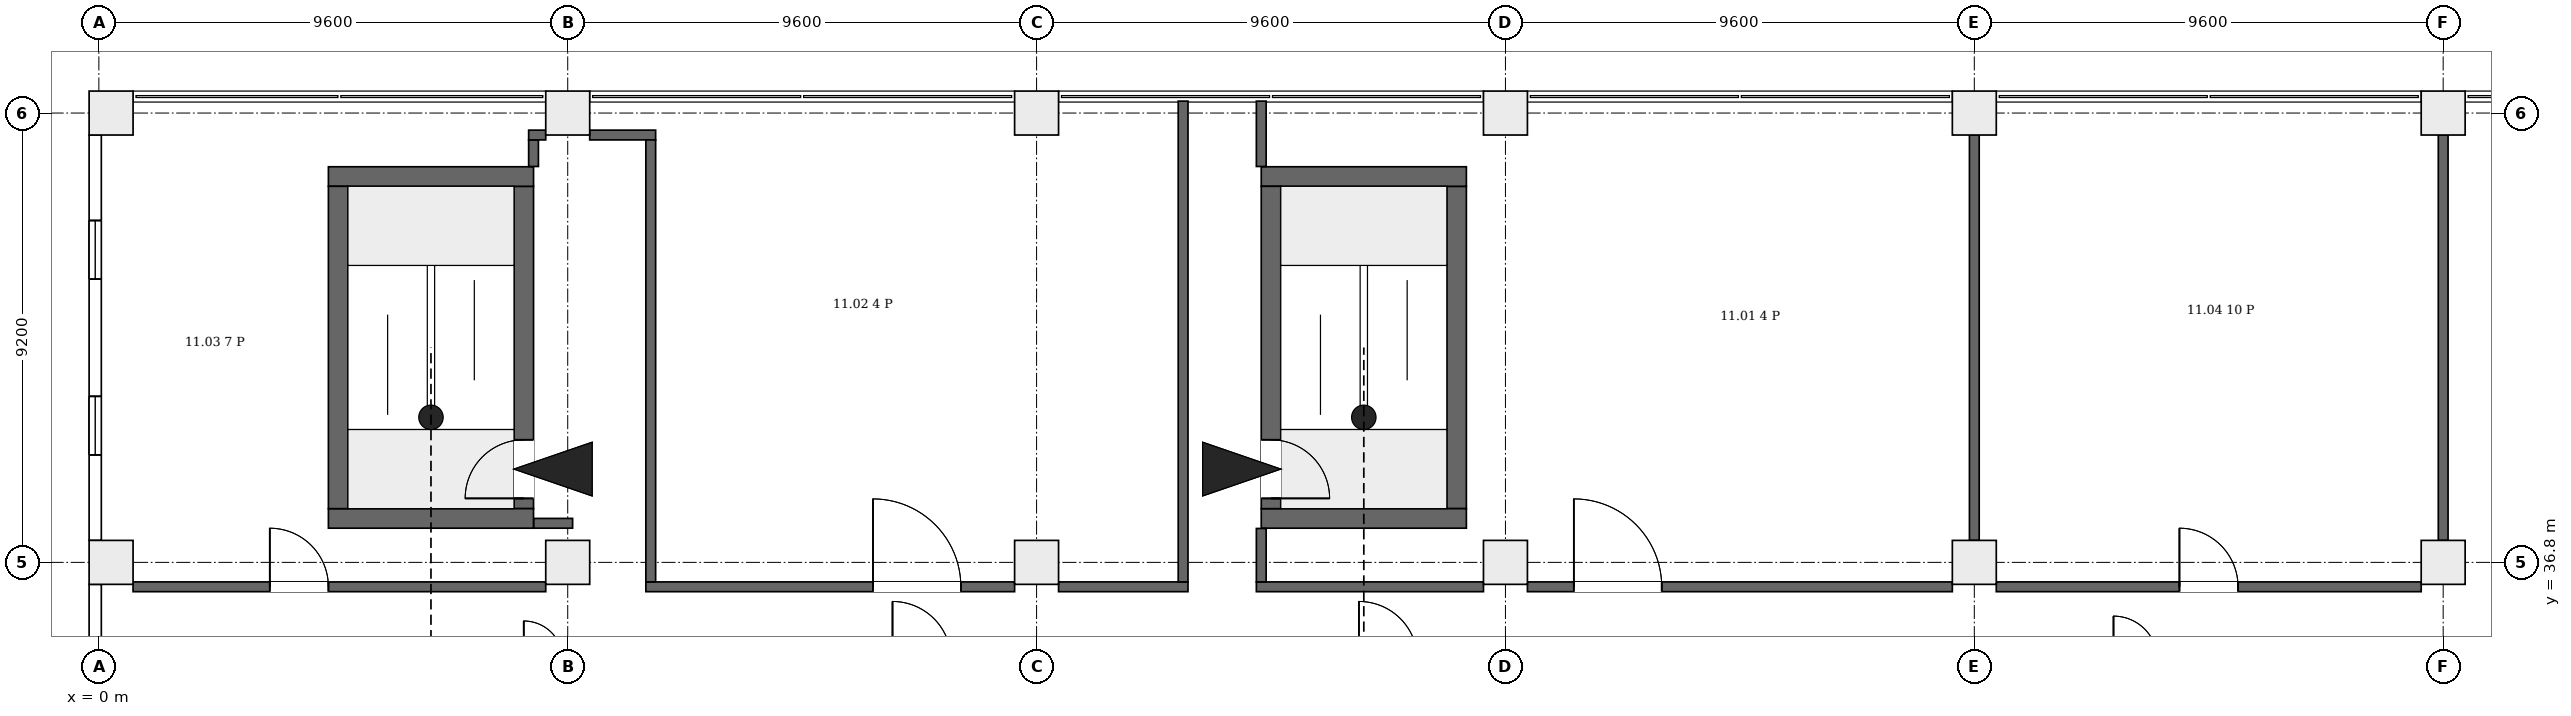
"""IFC4 building model, lengths in metres.
Left out: names, types, materials, properties, quantities, classifications, styles, units other than length and angle.
Written with IfcOpenShell. Run it as: python <this file> out.ifc"""

import sys

from ifc_helpers import new_model, si_unit, direction, frame, frame_2d, origin, origin_2d, place, context, subcontext, project, spatial, rectangle, extrude, element, fill, save


model = new_model("IFC4")
c1 = context("Model", 3, precision=1e-05, world=origin(), true_north=direction((0.0, 1.0)))
c2 = subcontext(c1, "Body", "Model", "MODEL_VIEW")
j1 = project(units=[si_unit("LENGTHUNIT", "METRE"), si_unit("PLANEANGLEUNIT", "RADIAN")], contexts=[c1])
p1 = place(None, origin())
s1 = spatial("IfcSite", under=j1, at=p1, CompositionType="ELEMENT")
p2 = place(p1, origin())
s2 = spatial("IfcBuilding", under=s1, at=p2, CompositionType="ELEMENT")
p3 = place(p2, frame((0.0, 0.0, 57.1)))
s3 = spatial("IfcBuildingStorey", under=s2, at=p3, CompositionType="ELEMENT", Elevation=57.1)
for number, where, z_axis, x_axis in (
    (1, (4.7, 37.7, 0.0), (0.0, 0.0, 1.0), (1.0, 0.0, 0.0)),
    (2, (4.7, 44.7, 0.0), (0.0, 0.0, 1.0), (1.0, 0.0, 0.0)),
):
    element("IfcWall", number, at=place(p3, frame(where, z_axis=z_axis, x_axis=x_axis)), inside=s3, PredefinedType="SHEAR", context=c2, shape_type="SweptSolid", body=[
        extrude(rectangle(XDim=4.2, YDim=0.4, at=frame_2d((2.1, 0.0))), origin(), (0.0, 0.0, 1.0), 4.2),
    ])
p4 = place(p3, frame((4.9, 37.9, 0.0), z_axis=(0.0, 0.0, 1.0), x_axis=(0.0, 1.0, 0.0)))
e3 = element("IfcWall", 3, at=p4, inside=s3, PredefinedType="SHEAR", context=c2, shape_type="SweptSolid", body=[
    extrude(rectangle(XDim=6.6, YDim=0.4, at=frame_2d((3.3, 0.0))), origin(), (0.0, 0.0, 1.0), 4.2),
])
p5 = place(p3, frame((8.7, 37.9, 0.0), z_axis=(0.0, 0.0, 1.0), x_axis=(0.0, 1.0, 0.0)))
e4 = element("IfcWall", 4, at=p5, inside=s3, PredefinedType="SHEAR", context=c2, shape_type="SweptSolid", body=[
    extrude(rectangle(XDim=6.6, YDim=0.4, at=frame_2d((3.3, 0.0))), origin(), (0.0, 0.0, 1.0), 4.2),
])
p6 = place(p5, frame((0.21, 0.0, 0.0)))
e5 = element("IfcOpeningElement", 5, at=p6, cuts=e4, PredefinedType="OPENING", context=c2, shape_type="SweptSolid", body=[
    extrude(rectangle(XDim=1.2, YDim=2.1, at=frame_2d((0.6, 1.05))), frame((0.0, 0.21, 0.0), z_axis=(0.0, -1.0, 0.0), x_axis=(1.0, 0.0, 0.0)), (0.0, 0.0, 1.0), 0.42),
])
for number, where, z_axis, x_axis in (
    (6, (23.8, 37.7, 0.0), (0.0, 0.0, 1.0), (1.0, 0.0, 0.0)),
    (7, (23.8, 44.7, 0.0), (0.0, 0.0, 1.0), (1.0, 0.0, 0.0)),
):
    element("IfcWall", number, at=place(p3, frame(where, z_axis=z_axis, x_axis=x_axis)), inside=s3, PredefinedType="SHEAR", context=c2, shape_type="SweptSolid", body=[
        extrude(rectangle(XDim=4.2, YDim=0.4, at=frame_2d((2.1, 0.0))), origin(), (0.0, 0.0, 1.0), 4.2),
    ])
p7 = place(p3, frame((24.0, 37.9, 0.0), z_axis=(0.0, 0.0, 1.0), x_axis=(0.0, 1.0, 0.0)))
e8 = element("IfcWall", 8, at=p7, inside=s3, PredefinedType="SHEAR", context=c2, shape_type="SweptSolid", body=[
    extrude(rectangle(XDim=6.6, YDim=0.4, at=frame_2d((3.3, 0.0))), origin(), (0.0, 0.0, 1.0), 4.2),
])
p8 = place(p7, frame((0.21, 0.0, 0.0)))
e9 = element("IfcOpeningElement", 9, at=p8, cuts=e8, PredefinedType="OPENING", context=c2, shape_type="SweptSolid", body=[
    extrude(rectangle(XDim=1.2, YDim=2.1, at=frame_2d((0.6, 1.05))), frame((0.0, 0.21, 0.0), z_axis=(0.0, -1.0, 0.0), x_axis=(1.0, 0.0, 0.0)), (0.0, 0.0, 1.0), 0.42),
])
p9 = place(p3, frame((27.8, 37.9, 0.0), z_axis=(0.0, 0.0, 1.0), x_axis=(0.0, 1.0, 0.0)))
e10 = element("IfcWall", 10, at=p9, inside=s3, PredefinedType="SHEAR", context=c2, shape_type="SweptSolid", body=[
    extrude(rectangle(XDim=6.6, YDim=0.4, at=frame_2d((3.3, 0.0))), origin(), (0.0, 0.0, 1.0), 4.2),
])
for number, where, z_axis, x_axis in (
    (11, (0.25, 36.8, 0.0), (0.0, 0.0, 1.0), (1.0, 0.0, 0.0)),
    (12, (9.6, 36.8, 0.0), (0.0, 0.0, 1.0), (1.0, 0.0, 0.0)),
    (13, (19.2, 36.8, 0.0), (0.0, 0.0, 1.0), (1.0, 0.0, 0.0)),
    (14, (28.8, 36.8, 0.0), (0.0, 0.0, 1.0), (1.0, 0.0, 0.0)),
    (15, (38.4, 36.8, 0.0), (0.0, 0.0, 1.0), (1.0, 0.0, 0.0)),
    (16, (48.0, 36.8, 0.0), (0.0, 0.0, 1.0), (1.0, 0.0, 0.0)),
    (17, (0.25, 46.0, 0.0), (0.0, 0.0, 1.0), (1.0, 0.0, 0.0)),
    (18, (9.6, 46.0, 0.0), (0.0, 0.0, 1.0), (1.0, 0.0, 0.0)),
    (19, (19.2, 46.0, 0.0), (0.0, 0.0, 1.0), (1.0, 0.0, 0.0)),
    (20, (28.8, 46.0, 0.0), (0.0, 0.0, 1.0), (1.0, 0.0, 0.0)),
    (21, (38.4, 46.0, 0.0), (0.0, 0.0, 1.0), (1.0, 0.0, 0.0)),
    (22, (48.0, 46.0, 0.0), (0.0, 0.0, 1.0), (1.0, 0.0, 0.0)),
):
    element("IfcColumn", number, at=place(p3, frame(where, z_axis=z_axis, x_axis=x_axis)), inside=s3, PredefinedType="COLUMN", context=c2, shape_type="SweptSolid", body=[
        extrude(rectangle(XDim=0.9, YDim=0.9, at=origin_2d()), origin(), (0.0, 0.0, 1.0), 4.2),
    ])
p10 = place(p3, frame((-0.074, 36.35, 0.0), z_axis=(0.0, 0.0, 1.0), x_axis=(0.0, -1.0, 0.0)))
e23 = element("IfcWall", 23, at=p10, inside=s3, PredefinedType="ELEMENTEDWALL", context=c2, shape_type="SweptSolid", body=[
    extrude(rectangle(XDim=8.3, YDim=0.25, at=frame_2d((4.15, 0.0))), origin(), (0.0, 0.0, 1.0), 3.9),
])
p11 = place(p10, frame((5.35, 0.0, 0.9)))
e24 = element("IfcOpeningElement", 24, at=p11, cuts=e23, PredefinedType="OPENING", context=c2, shape_type="SweptSolid", body=[
    extrude(rectangle(XDim=1.2, YDim=2.6, at=frame_2d((0.6, 1.3))), frame((0.0, 0.135, 0.0), z_axis=(0.0, -1.0, 0.0), x_axis=(1.0, 0.0, 0.0)), (0.0, 0.0, 1.0), 0.27),
])
p12 = place(p10, frame((1.75, 0.0, 0.9)))
e25 = element("IfcOpeningElement", 25, at=p12, cuts=e23, PredefinedType="OPENING", context=c2, shape_type="SweptSolid", body=[
    extrude(rectangle(XDim=1.2, YDim=2.6, at=frame_2d((0.6, 1.3))), frame((0.0, 0.135, 0.0), z_axis=(0.0, -1.0, 0.0), x_axis=(1.0, 0.0, 0.0)), (0.0, 0.0, 1.0), 0.27),
])
p13 = place(p3, frame((-0.074, 45.55, 0.0), z_axis=(0.0, 0.0, 1.0), x_axis=(0.0, -1.0, 0.0)))
e26 = element("IfcWall", 26, at=p13, inside=s3, PredefinedType="ELEMENTEDWALL", context=c2, shape_type="SweptSolid", body=[
    extrude(rectangle(XDim=8.3, YDim=0.25, at=frame_2d((4.15, 0.0))), origin(), (0.0, 0.0, 1.0), 3.9),
])
p14 = place(p13, frame((5.35, 0.0, 0.9)))
e27 = element("IfcOpeningElement", 27, at=p14, cuts=e26, PredefinedType="OPENING", context=c2, shape_type="SweptSolid", body=[
    extrude(rectangle(XDim=1.2, YDim=2.6, at=frame_2d((0.6, 1.3))), frame((0.0, 0.135, 0.0), z_axis=(0.0, -1.0, 0.0), x_axis=(1.0, 0.0, 0.0)), (0.0, 0.0, 1.0), 0.27),
])
p15 = place(p13, frame((1.75, 0.0, 0.9)))
e28 = element("IfcOpeningElement", 28, at=p15, cuts=e26, PredefinedType="OPENING", context=c2, shape_type="SweptSolid", body=[
    extrude(rectangle(XDim=1.2, YDim=2.6, at=frame_2d((0.6, 1.3))), frame((0.0, 0.135, 0.0), z_axis=(0.0, -1.0, 0.0), x_axis=(1.0, 0.0, 0.0)), (0.0, 0.0, 1.0), 0.27),
])
p16 = place(p3, frame((0.7, 36.3, 0.0), z_axis=(0.0, 0.0, 1.0), x_axis=(1.0, 0.0, 0.0)))
e29 = element("IfcWall", 29, at=p16, inside=s3, PredefinedType="PARTITIONING", context=c2, shape_type="SweptSolid", body=[
    extrude(rectangle(XDim=8.45, YDim=0.2, at=frame_2d((4.225, 0.0))), origin(), (0.0, 0.0, 1.0), 3.9),
])
p17 = place(p16, frame((2.8, 0.0, 0.0)))
e30 = element("IfcOpeningElement", 30, at=p17, cuts=e29, PredefinedType="OPENING", context=c2, shape_type="SweptSolid", body=[
    extrude(rectangle(XDim=1.2, YDim=2.1, at=frame_2d((0.6, 1.05))), frame((0.0, 0.11, 0.0), z_axis=(0.0, -1.0, 0.0), x_axis=(1.0, 0.0, 0.0)), (0.0, 0.0, 1.0), 0.22),
])
p18 = place(p3, frame((8.9, 44.906, 0.0), z_axis=(0.0, 0.0, 1.0), x_axis=(0.0, 1.0, 0.0)))
e31 = element("IfcWall", 31, at=p18, inside=s3, PredefinedType="PARTITIONING", context=c2, shape_type="SweptSolid", body=[
    extrude(rectangle(XDim=0.544, YDim=0.2, at=frame_2d((0.272, 0.0))), origin(), (0.0, 0.0, 1.0), 3.9),
])
p19 = place(p3, frame((8.8, 45.55, 0.0), z_axis=(0.0, 0.0, 1.0), x_axis=(1.0, 0.0, 0.0)))
e32 = element("IfcWall", 32, at=p19, inside=s3, PredefinedType="PARTITIONING", context=c2, shape_type="SweptSolid", body=[
    extrude(rectangle(XDim=0.35, YDim=0.2, at=frame_2d((0.175, 0.0))), origin(), (0.0, 0.0, 1.0), 3.9),
])
p20 = place(p3, frame((8.906, 37.6, 0.0), z_axis=(0.0, 0.0, 1.0), x_axis=(1.0, 0.0, 0.0)))
e33 = element("IfcWall", 33, at=p20, inside=s3, PredefinedType="PARTITIONING", context=c2, shape_type="SweptSolid", body=[
    extrude(rectangle(XDim=0.794, YDim=0.2, at=frame_2d((0.397, 0.0))), origin(), (0.0, 0.0, 1.0), 3.9),
])
p21 = place(p3, frame((10.05, 45.55, 0.0), z_axis=(0.0, 0.0, 1.0), x_axis=(1.0, 0.0, 0.0)))
e34 = element("IfcWall", 34, at=p21, inside=s3, PredefinedType="PARTITIONING", context=c2, shape_type="SweptSolid", body=[
    extrude(rectangle(XDim=1.35, YDim=0.2, at=frame_2d((0.675, 0.0))), origin(), (0.0, 0.0, 1.0), 3.9),
])
p22 = place(p3, frame((11.2, 36.3, 0.0), z_axis=(0.0, 0.0, 1.0), x_axis=(1.0, 0.0, 0.0)))
e35 = element("IfcWall", 35, at=p22, inside=s3, PredefinedType="PARTITIONING", context=c2, shape_type="SweptSolid", body=[
    extrude(rectangle(XDim=7.55, YDim=0.2, at=frame_2d((3.775, 0.0))), origin(), (0.0, 0.0, 1.0), 3.9),
])
p23 = place(p22, frame((4.65, 0.0, 0.0)))
e36 = element("IfcOpeningElement", 36, at=p23, cuts=e35, PredefinedType="OPENING", context=c2, shape_type="SweptSolid", body=[
    extrude(rectangle(XDim=1.8, YDim=2.1, at=frame_2d((0.9, 1.05))), frame((0.0, 0.11, 0.0), z_axis=(0.0, -1.0, 0.0), x_axis=(1.0, 0.0, 0.0)), (0.0, 0.0, 1.0), 0.22),
])
p24 = place(p3, frame((11.3, 36.4, 0.0), z_axis=(0.0, 0.0, 1.0), x_axis=(0.0, 1.0, 0.0)))
e37 = element("IfcWall", 37, at=p24, inside=s3, PredefinedType="PARTITIONING", context=c2, shape_type="SweptSolid", body=[
    extrude(rectangle(XDim=9.05, YDim=0.2, at=frame_2d((4.525, 0.0))), origin(), (0.0, 0.0, 1.0), 3.9),
])
p25 = place(p3, frame((19.65, 36.3, 0.0), z_axis=(0.0, 0.0, 1.0), x_axis=(1.0, 0.0, 0.0)))
e38 = element("IfcWall", 38, at=p25, inside=s3, PredefinedType="PARTITIONING", context=c2, shape_type="SweptSolid", body=[
    extrude(rectangle(XDim=2.65, YDim=0.2, at=frame_2d((1.325, 0.0))), origin(), (0.0, 0.0, 1.0), 3.9),
])
p26 = place(p3, frame((22.2, 36.4, 0.0), z_axis=(0.0, 0.0, 1.0), x_axis=(0.0, 1.0, 0.0)))
e39 = element("IfcWall", 39, at=p26, inside=s3, PredefinedType="PARTITIONING", context=c2, shape_type="SweptSolid", body=[
    extrude(rectangle(XDim=9.844, YDim=0.2, at=frame_2d((4.922, 0.0))), origin(), (0.0, 0.0, 1.0), 3.9),
])
p27 = place(p3, frame((23.7, 36.3, 0.0), z_axis=(0.0, 0.0, 1.0), x_axis=(1.0, 0.0, 0.0)))
e40 = element("IfcWall", 40, at=p27, inside=s3, PredefinedType="PARTITIONING", context=c2, shape_type="SweptSolid", body=[
    extrude(rectangle(XDim=4.65, YDim=0.2, at=frame_2d((2.325, 0.0))), origin(), (0.0, 0.0, 1.0), 3.9),
])
p28 = place(p3, frame((23.8, 36.4, 0.0), z_axis=(0.0, 0.0, 1.0), x_axis=(0.0, 1.0, 0.0)))
e41 = element("IfcWall", 41, at=p28, inside=s3, PredefinedType="PARTITIONING", context=c2, shape_type="SweptSolid", body=[
    extrude(rectangle(XDim=1.094, YDim=0.2, at=frame_2d((0.547, 0.0))), origin(), (0.0, 0.0, 1.0), 3.9),
])
p29 = place(p3, frame((23.8, 44.906, 0.0), z_axis=(0.0, 0.0, 1.0), x_axis=(0.0, 1.0, 0.0)))
e42 = element("IfcWall", 42, at=p29, inside=s3, PredefinedType="PARTITIONING", context=c2, shape_type="SweptSolid", body=[
    extrude(rectangle(XDim=1.338, YDim=0.2, at=frame_2d((0.669, 0.0))), origin(), (0.0, 0.0, 1.0), 3.9),
])
p30 = place(p3, frame((29.25, 36.3, 0.0), z_axis=(0.0, 0.0, 1.0), x_axis=(1.0, 0.0, 0.0)))
e43 = element("IfcWall", 43, at=p30, inside=s3, PredefinedType="PARTITIONING", context=c2, shape_type="SweptSolid", body=[
    extrude(rectangle(XDim=8.7, YDim=0.2, at=frame_2d((4.35, 0.0))), origin(), (0.0, 0.0, 1.0), 3.9),
])
p31 = place(p30, frame((0.95, 0.0, 0.0)))
e44 = element("IfcOpeningElement", 44, at=p31, cuts=e43, PredefinedType="OPENING", context=c2, shape_type="SweptSolid", body=[
    extrude(rectangle(XDim=1.8, YDim=2.1, at=frame_2d((0.9, 1.05))), frame((0.0, 0.11, 0.0), z_axis=(0.0, -1.0, 0.0), x_axis=(1.0, 0.0, 0.0)), (0.0, 0.0, 1.0), 0.22),
])
p32 = place(p3, frame((38.4, 37.25, 0.0), z_axis=(0.0, 0.0, 1.0), x_axis=(0.0, 1.0, 0.0)))
e45 = element("IfcWall", 45, at=p32, inside=s3, PredefinedType="PARTITIONING", context=c2, shape_type="SweptSolid", body=[
    extrude(rectangle(XDim=8.3, YDim=0.2, at=frame_2d((4.15, 0.0))), origin(), (0.0, 0.0, 1.0), 3.9),
])
p33 = place(p3, frame((38.85, 36.3, 0.0), z_axis=(0.0, 0.0, 1.0), x_axis=(1.0, 0.0, 0.0)))
e46 = element("IfcWall", 46, at=p33, inside=s3, PredefinedType="PARTITIONING", context=c2, shape_type="SweptSolid", body=[
    extrude(rectangle(XDim=8.7, YDim=0.2, at=frame_2d((4.35, 0.0))), origin(), (0.0, 0.0, 1.0), 3.9),
])
p34 = place(p33, frame((3.75, 0.0, 0.0)))
e47 = element("IfcOpeningElement", 47, at=p34, cuts=e46, PredefinedType="OPENING", context=c2, shape_type="SweptSolid", body=[
    extrude(rectangle(XDim=1.2, YDim=2.1, at=frame_2d((0.6, 1.05))), frame((0.0, 0.11, 0.0), z_axis=(0.0, -1.0, 0.0), x_axis=(1.0, 0.0, 0.0)), (0.0, 0.0, 1.0), 0.22),
])
p35 = place(p3, frame((48.0, 37.25, 0.0), z_axis=(0.0, 0.0, 1.0), x_axis=(0.0, 1.0, 0.0)))
e48 = element("IfcWall", 48, at=p35, inside=s3, PredefinedType="PARTITIONING", context=c2, shape_type="SweptSolid", body=[
    extrude(rectangle(XDim=8.3, YDim=0.2, at=frame_2d((4.15, 0.0))), origin(), (0.0, 0.0, 1.0), 3.3),
])
p36 = place(p14, origin())
e49 = element("IfcWindow", 49, at=p36, inside=s3, PartitioningType="SINGLE_PANEL", PredefinedType="WINDOW", context=c2, shape_type="SweptSolid", body=[
    extrude(rectangle(XDim=1.2, YDim=2.6, at=frame_2d((0.6, 1.3))), frame((0.0, 0.03, 0.0), z_axis=(0.0, -1.0, 0.0), x_axis=(1.0, 0.0, 0.0)), (0.0, 0.0, 1.0), 0.06),
])
fill(e27, e49)
p37 = place(p15, origin())
e50 = element("IfcWindow", 50, at=p37, inside=s3, PartitioningType="SINGLE_PANEL", PredefinedType="WINDOW", context=c2, shape_type="SweptSolid", body=[
    extrude(rectangle(XDim=1.2, YDim=2.6, at=frame_2d((0.6, 1.3))), frame((0.0, 0.03, 0.0), z_axis=(0.0, -1.0, 0.0), x_axis=(1.0, 0.0, 0.0)), (0.0, 0.0, 1.0), 0.06),
])
fill(e28, e50)
p38 = place(p6, origin())
e51 = element("IfcDoor", 51, at=p38, inside=s3, OperationType="SINGLE_SWING_RIGHT", PredefinedType="DOOR", context=c2, shape_type="SweptSolid", body=[
    extrude(rectangle(XDim=1.2, YDim=2.1, at=frame_2d((0.6, 1.05))), frame((0.0, 0.025, 0.0), z_axis=(0.0, -1.0, 0.0), x_axis=(1.0, 0.0, 0.0)), (0.0, 0.0, 1.0), 0.05),
])
fill(e5, e51)
p39 = place(p8, origin())
e52 = element("IfcDoor", 52, at=p39, inside=s3, OperationType="SINGLE_SWING_LEFT", PredefinedType="DOOR", context=c2, shape_type="SweptSolid", body=[
    extrude(rectangle(XDim=1.2, YDim=2.1, at=frame_2d((0.6, 1.05))), frame((0.0, 0.025, 0.0), z_axis=(0.0, -1.0, 0.0), x_axis=(1.0, 0.0, 0.0)), (0.0, 0.0, 1.0), 0.05),
])
fill(e9, e52)
p40 = place(p17, origin())
e53 = element("IfcDoor", 53, at=p40, inside=s3, OperationType="SINGLE_SWING_RIGHT", PredefinedType="DOOR", context=c2, shape_type="SweptSolid", body=[
    extrude(rectangle(XDim=1.2, YDim=2.1, at=frame_2d((0.6, 1.05))), frame((0.0, 0.025, 0.0), z_axis=(0.0, -1.0, 0.0), x_axis=(1.0, 0.0, 0.0)), (0.0, 0.0, 1.0), 0.05),
])
fill(e30, e53)
p41 = place(p23, origin())
e54 = element("IfcDoor", 54, at=p41, inside=s3, OperationType="DOUBLE_DOOR_SINGLE_SWING", PredefinedType="DOOR", context=c2, shape_type="SweptSolid", body=[
    extrude(rectangle(XDim=1.8, YDim=2.1, at=frame_2d((0.9, 1.05))), frame((0.0, 0.025, 0.0), z_axis=(0.0, -1.0, 0.0), x_axis=(1.0, 0.0, 0.0)), (0.0, 0.0, 1.0), 0.05),
])
fill(e36, e54)
p42 = place(p31, origin())
e55 = element("IfcDoor", 55, at=p42, inside=s3, OperationType="DOUBLE_DOOR_SINGLE_SWING", PredefinedType="DOOR", context=c2, shape_type="SweptSolid", body=[
    extrude(rectangle(XDim=1.8, YDim=2.1, at=frame_2d((0.9, 1.05))), frame((0.0, 0.025, 0.0), z_axis=(0.0, -1.0, 0.0), x_axis=(1.0, 0.0, 0.0)), (0.0, 0.0, 1.0), 0.05),
])
fill(e44, e55)
p43 = place(p34, origin())
e56 = element("IfcDoor", 56, at=p43, inside=s3, OperationType="SINGLE_SWING_LEFT", PredefinedType="DOOR", context=c2, shape_type="SweptSolid", body=[
    extrude(rectangle(XDim=1.2, YDim=2.1, at=frame_2d((0.6, 1.05))), frame((0.0, 0.025, 0.0), z_axis=(0.0, -1.0, 0.0), x_axis=(1.0, 0.0, 0.0)), (0.0, 0.0, 1.0), 0.05),
])
fill(e47, e56)
save(model, sys.argv[1])
